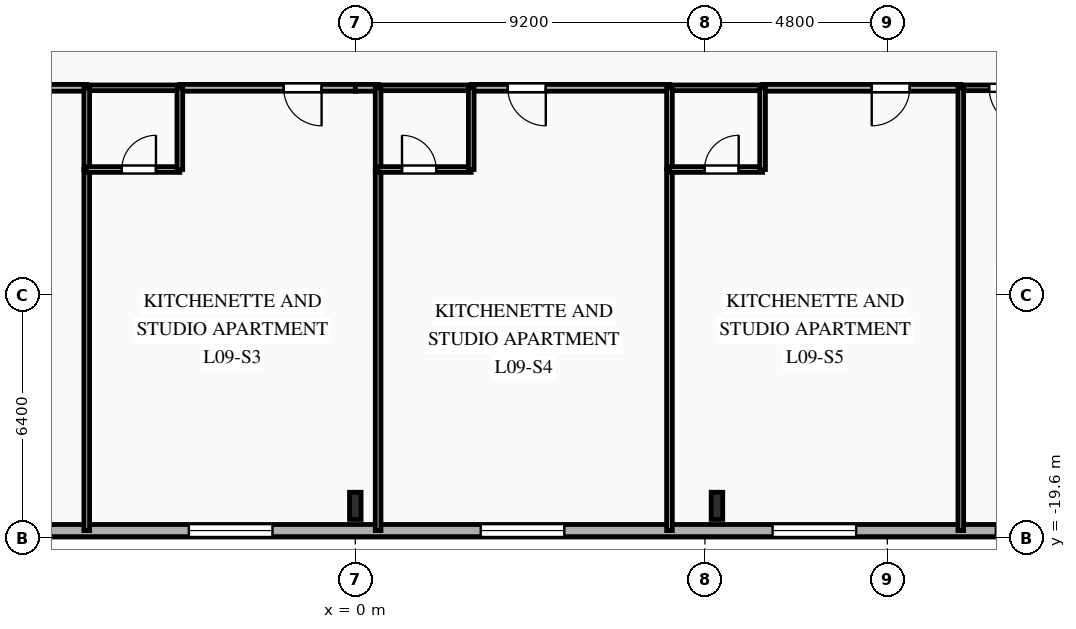
"""IFC4 building model, lengths in metres.
Left out: names, types, materials, properties, quantities, classifications, styles, units other than length and angle.
Written with IfcOpenShell. Run it as: python <this file> out.ifc"""

import sys

from ifc_helpers import new_model, si_unit, direction, frame, frame_2d, origin, origin_2d, place, context, subcontext, project, spatial, rectangle, i_section, extrude, element, fill, save


model = new_model("IFC4")
c1 = context("Model", 3, precision=1e-05, world=origin(), true_north=direction((0.0, 1.0)))
c2 = subcontext(c1, "Body", "Model", "MODEL_VIEW")
j1 = project(units=[si_unit("LENGTHUNIT", "METRE"), si_unit("PLANEANGLEUNIT", "RADIAN")], contexts=[c1])
p1 = place(None, origin())
s1 = spatial("IfcSite", under=j1, at=p1, CompositionType="ELEMENT")
p2 = place(p1, origin())
s2 = spatial("IfcBuilding", under=s1, at=p2, CompositionType="ELEMENT")
p3 = place(p2, frame((0.0, 0.0, 37.05)))
s3 = spatial("IfcBuildingStorey", under=s2, at=p3, CompositionType="ELEMENT", Elevation=37.05)
for number, where, z_axis, x_axis in (
    (1, (0.0, -18.75, 0.0), (0.0, 0.0, 1.0), (1.0, 0.0, 0.0)),
    (2, (9.517, -18.75, 0.0), (0.0, 0.0, 1.0), (1.0, 0.0, 0.0)),
):
    element("IfcColumn", number, at=place(p3, frame(where, z_axis=z_axis, x_axis=x_axis)), inside=s3, PredefinedType="COLUMN", context=c2, shape_type="SweptSolid", body=[
        extrude(i_section(OverallWidth=0.304, OverallDepth=0.716, WebThickness=0.021, FlangeThickness=0.04, FilletRadius=0.027, at=origin_2d()), origin(), (0.0, 0.0, 1.0), 3.35),
    ])
p4 = place(p3, frame((29.2, -19.4, 0.0), z_axis=(0.0, 0.0, 1.0), x_axis=(-1.0, 0.0, 0.0)))
e3 = element("IfcWall", 3, at=p4, inside=s3, PredefinedType="SOLIDWALL", context=c2, shape_type="SweptSolid", body=[
    extrude(rectangle(XDim=58.4, YDim=0.32, at=frame_2d((29.2, 0.0))), origin(), (0.0, 0.0, 1.0), 3.035),
])
p5 = place(p4, frame((3.055, 0.0, 0.85)))
e4 = element("IfcOpeningElement", 4, at=p5, cuts=e3, PredefinedType="OPENING", context=c2, shape_type="SweptSolid", body=[
    extrude(rectangle(XDim=1.65, YDim=1.85, at=frame_2d((0.825, 0.925))), frame((0.0, 0.17, 0.0), z_axis=(0.0, -1.0, 0.0), x_axis=(1.0, 0.0, 0.0)), (0.0, 0.0, 1.0), 0.34),
])
p6 = place(p4, frame((7.175, 0.0, 0.85)))
e5 = element("IfcOpeningElement", 5, at=p6, cuts=e3, PredefinedType="OPENING", context=c2, shape_type="SweptSolid", body=[
    extrude(rectangle(XDim=1.65, YDim=1.85, at=frame_2d((0.825, 0.925))), frame((0.0, 0.17, 0.0), z_axis=(0.0, -1.0, 0.0), x_axis=(1.0, 0.0, 0.0)), (0.0, 0.0, 1.0), 0.34),
])
p7 = place(p4, frame((10.695, 0.0, 0.85)))
e6 = element("IfcOpeningElement", 6, at=p7, cuts=e3, PredefinedType="OPENING", context=c2, shape_type="SweptSolid", body=[
    extrude(rectangle(XDim=1.65, YDim=1.85, at=frame_2d((0.825, 0.925))), frame((0.0, 0.17, 0.0), z_axis=(0.0, -1.0, 0.0), x_axis=(1.0, 0.0, 0.0)), (0.0, 0.0, 1.0), 0.34),
])
p8 = place(p4, frame((16.02, 0.0, 0.85)))
e7 = element("IfcOpeningElement", 7, at=p8, cuts=e3, PredefinedType="OPENING", context=c2, shape_type="SweptSolid", body=[
    extrude(rectangle(XDim=2.2, YDim=1.85, at=frame_2d((1.1, 0.925))), frame((0.0, 0.17, 0.0), z_axis=(0.0, -1.0, 0.0), x_axis=(1.0, 0.0, 0.0)), (0.0, 0.0, 1.0), 0.34),
])
p9 = place(p4, frame((23.7, 0.0, 0.85)))
e8 = element("IfcOpeningElement", 8, at=p9, cuts=e3, PredefinedType="OPENING", context=c2, shape_type="SweptSolid", body=[
    extrude(rectangle(XDim=2.2, YDim=1.85, at=frame_2d((1.1, 0.925))), frame((0.0, 0.17, 0.0), z_axis=(0.0, -1.0, 0.0), x_axis=(1.0, 0.0, 0.0)), (0.0, 0.0, 1.0), 0.34),
])
p10 = place(p4, frame((31.38, 0.0, 0.85)))
e9 = element("IfcOpeningElement", 9, at=p10, cuts=e3, PredefinedType="OPENING", context=c2, shape_type="SweptSolid", body=[
    extrude(rectangle(XDim=2.2, YDim=1.85, at=frame_2d((1.1, 0.925))), frame((0.0, 0.17, 0.0), z_axis=(0.0, -1.0, 0.0), x_axis=(1.0, 0.0, 0.0)), (0.0, 0.0, 1.0), 0.34),
])
p11 = place(p4, frame((39.06, 0.0, 0.85)))
e10 = element("IfcOpeningElement", 10, at=p11, cuts=e3, PredefinedType="OPENING", context=c2, shape_type="SweptSolid", body=[
    extrude(rectangle(XDim=2.2, YDim=1.85, at=frame_2d((1.1, 0.925))), frame((0.0, 0.17, 0.0), z_axis=(0.0, -1.0, 0.0), x_axis=(1.0, 0.0, 0.0)), (0.0, 0.0, 1.0), 0.34),
])
p12 = place(p4, frame((45.215, 0.0, 0.85)))
e11 = element("IfcOpeningElement", 11, at=p12, cuts=e3, PredefinedType="OPENING", context=c2, shape_type="SweptSolid", body=[
    extrude(rectangle(XDim=1.65, YDim=1.85, at=frame_2d((0.825, 0.925))), frame((0.0, 0.17, 0.0), z_axis=(0.0, -1.0, 0.0), x_axis=(1.0, 0.0, 0.0)), (0.0, 0.0, 1.0), 0.34),
])
p13 = place(p4, frame((49.335, 0.0, 0.85)))
e12 = element("IfcOpeningElement", 12, at=p13, cuts=e3, PredefinedType="OPENING", context=c2, shape_type="SweptSolid", body=[
    extrude(rectangle(XDim=1.65, YDim=1.85, at=frame_2d((0.825, 0.925))), frame((0.0, 0.17, 0.0), z_axis=(0.0, -1.0, 0.0), x_axis=(1.0, 0.0, 0.0)), (0.0, 0.0, 1.0), 0.34),
])
p14 = place(p3, frame((-7.067, -7.75, 0.0), z_axis=(0.0, 0.0, 1.0), x_axis=(-1.0, 0.0, 0.0)))
e13 = element("IfcWall", 13, at=p14, inside=s3, PredefinedType="PARTITIONING", context=c2, shape_type="SweptSolid", body=[
    extrude(rectangle(XDim=5.216, YDim=0.18, at=frame_2d((2.608, 0.0))), origin(), (0.0, 0.0, 1.0), 3.035),
])
p15 = place(p14, frame((3.254, 0.0, 0.0)))
e14 = element("IfcOpeningElement", 14, at=p15, cuts=e13, PredefinedType="OPENING", context=c2, shape_type="SweptSolid", body=[
    extrude(rectangle(XDim=1.0, YDim=2.15, at=frame_2d((0.5, 1.075))), frame((0.0, 0.1, 0.0), z_axis=(0.0, -1.0, 0.0), x_axis=(1.0, 0.0, 0.0)), (0.0, 0.0, 1.0), 0.2),
])
p16 = place(p3, frame((0.0, -7.75, 0.0), z_axis=(0.0, 0.0, 1.0), x_axis=(-1.0, 0.0, 0.0)))
e15 = element("IfcWall", 15, at=p16, inside=s3, PredefinedType="PARTITIONING", context=c2, shape_type="SweptSolid", body=[
    extrude(rectangle(XDim=4.617, YDim=0.18, at=frame_2d((2.309, 0.0))), origin(), (0.0, 0.0, 1.0), 3.035),
])
p17 = place(p16, frame((0.887, 0.0, 0.0)))
e16 = element("IfcOpeningElement", 16, at=p17, cuts=e15, PredefinedType="OPENING", context=c2, shape_type="SweptSolid", body=[
    extrude(rectangle(XDim=1.0, YDim=2.15, at=frame_2d((0.5, 1.075))), frame((0.0, 0.1, 0.0), z_axis=(0.0, -1.0, 0.0), x_axis=(1.0, 0.0, 0.0)), (0.0, 0.0, 1.0), 0.2),
])
p18 = place(p3, frame((-4.617, -7.75, 0.0), z_axis=(0.0, 0.0, 1.0), x_axis=(-1.0, 0.0, 0.0)))
e17 = element("IfcWall", 17, at=p18, inside=s3, PredefinedType="PLUMBINGWALL", context=c2, shape_type="SweptSolid", body=[
    extrude(rectangle(XDim=2.45, YDim=0.15, at=frame_2d((1.225, 0.0))), origin(), (0.0, 0.0, 1.0), 3.035),
])
p19 = place(p3, frame((0.6, -7.75, 0.0), z_axis=(0.0, 0.0, 1.0), x_axis=(-1.0, 0.0, 0.0)))
e18 = element("IfcWall", 18, at=p19, inside=s3, PredefinedType="PARTITIONING", context=c2, shape_type="SweptSolid", body=[
    extrude(rectangle(XDim=0.6, YDim=0.18, at=frame_2d((0.3, 0.0))), origin(), (0.0, 0.0, 1.0), 3.035),
])
p20 = place(p3, frame((8.267, -7.75, 0.0), z_axis=(0.0, 0.0, 1.0), x_axis=(-1.0, 0.0, 0.0)))
e19 = element("IfcWall", 19, at=p20, inside=s3, PredefinedType="PARTITIONING", context=c2, shape_type="SweptSolid", body=[
    extrude(rectangle(XDim=5.217, YDim=0.18, at=frame_2d((2.608, 0.0))), origin(), (0.0, 0.0, 1.0), 3.035),
])
p21 = place(p20, frame((3.255, 0.0, 0.0)))
e20 = element("IfcOpeningElement", 20, at=p21, cuts=e19, PredefinedType="OPENING", context=c2, shape_type="SweptSolid", body=[
    extrude(rectangle(XDim=1.0, YDim=2.15, at=frame_2d((0.5, 1.075))), frame((0.0, 0.1, 0.0), z_axis=(0.0, -1.0, 0.0), x_axis=(1.0, 0.0, 0.0)), (0.0, 0.0, 1.0), 0.2),
])
p22 = place(p3, frame((3.05, -7.75, 0.0), z_axis=(0.0, 0.0, 1.0), x_axis=(-1.0, 0.0, 0.0)))
e21 = element("IfcWall", 21, at=p22, inside=s3, PredefinedType="PLUMBINGWALL", context=c2, shape_type="SweptSolid", body=[
    extrude(rectangle(XDim=2.45, YDim=0.15, at=frame_2d((1.225, 0.0))), origin(), (0.0, 0.0, 1.0), 3.035),
])
p23 = place(p3, frame((15.933, -7.75, 0.0), z_axis=(0.0, 0.0, 1.0), x_axis=(-1.0, 0.0, 0.0)))
e22 = element("IfcWall", 22, at=p23, inside=s3, PredefinedType="PARTITIONING", context=c2, shape_type="SweptSolid", body=[
    extrude(rectangle(XDim=5.216, YDim=0.18, at=frame_2d((2.608, 0.0))), origin(), (0.0, 0.0, 1.0), 3.035),
])
p24 = place(p23, frame((1.344, 0.0, 0.0)))
e23 = element("IfcOpeningElement", 23, at=p24, cuts=e22, PredefinedType="OPENING", context=c2, shape_type="SweptSolid", body=[
    extrude(rectangle(XDim=1.0, YDim=2.15, at=frame_2d((0.5, 1.075))), frame((0.0, 0.1, 0.0), z_axis=(0.0, -1.0, 0.0), x_axis=(1.0, 0.0, 0.0)), (0.0, 0.0, 1.0), 0.2),
])
p25 = place(p3, frame((10.717, -7.75, 0.0), z_axis=(0.0, 0.0, 1.0), x_axis=(-1.0, 0.0, 0.0)))
e24 = element("IfcWall", 24, at=p25, inside=s3, PredefinedType="PLUMBINGWALL", context=c2, shape_type="SweptSolid", body=[
    extrude(rectangle(XDim=2.45, YDim=0.15, at=frame_2d((1.225, 0.0))), origin(), (0.0, 0.0, 1.0), 3.035),
])
p26 = place(p3, frame((19.467, -7.75, 0.0), z_axis=(0.0, 0.0, 1.0), x_axis=(-1.0, 0.0, 0.0)))
e25 = element("IfcWall", 25, at=p26, inside=s3, PredefinedType="PARTITIONING", context=c2, shape_type="SweptSolid", body=[
    extrude(rectangle(XDim=3.533, YDim=0.15, at=frame_2d((1.767, 0.0))), origin(), (0.0, 0.0, 1.0), 3.035),
])
p27 = place(p26, frame((1.738, 0.0, 0.0)))
e26 = element("IfcOpeningElement", 26, at=p27, cuts=e25, PredefinedType="OPENING", context=c2, shape_type="SweptSolid", body=[
    extrude(rectangle(XDim=1.05, YDim=2.15, at=frame_2d((0.525, 1.075))), frame((0.0, 0.085, 0.0), z_axis=(0.0, -1.0, 0.0), x_axis=(1.0, 0.0, 0.0)), (0.0, 0.0, 1.0), 0.17),
])
p28 = place(p3, frame((-7.067, -9.9, 0.0), z_axis=(0.0, 0.0, 1.0), x_axis=(0.0, -1.0, 0.0)))
e27 = element("IfcWall", 27, at=p28, inside=s3, PredefinedType="PARTITIONING", context=c2, shape_type="SweptSolid", body=[
    extrude(rectangle(XDim=9.5, YDim=0.15, at=frame_2d((4.75, 0.0))), origin(), (0.0, 0.0, 1.0), 3.035),
])
p29 = place(p3, frame((-7.067, -7.75, 0.0), z_axis=(0.0, 0.0, 1.0), x_axis=(0.0, -1.0, 0.0)))
e28 = element("IfcWall", 28, at=p29, inside=s3, PredefinedType="PLUMBINGWALL", context=c2, shape_type="SweptSolid", body=[
    extrude(rectangle(XDim=2.15, YDim=0.15, at=frame_2d((1.075, 0.0))), origin(), (0.0, 0.0, 1.0), 3.035),
])
p30 = place(p3, frame((-7.067, -9.9, 0.0), z_axis=(0.0, 0.0, 1.0), x_axis=(1.0, 0.0, 0.0)))
e29 = element("IfcWall", 29, at=p30, inside=s3, PredefinedType="PLUMBINGWALL", context=c2, shape_type="SweptSolid", body=[
    extrude(rectangle(XDim=2.45, YDim=0.15, at=frame_2d((1.225, 0.0))), origin(), (0.0, 0.0, 1.0), 3.035),
])
p31 = place(p30, frame((0.921, 0.0, 0.0)))
e30 = element("IfcOpeningElement", 30, at=p31, cuts=e29, PredefinedType="OPENING", context=c2, shape_type="SweptSolid", body=[
    extrude(rectangle(XDim=0.9, YDim=2.1, at=frame_2d((0.45, 1.05))), frame((0.0, 0.085, 0.0), z_axis=(0.0, -1.0, 0.0), x_axis=(1.0, 0.0, 0.0)), (0.0, 0.0, 1.0), 0.17),
])
p32 = place(p3, frame((-4.617, -9.9, 0.0), z_axis=(0.0, 0.0, 1.0), x_axis=(0.0, 1.0, 0.0)))
e31 = element("IfcWall", 31, at=p32, inside=s3, PredefinedType="PLUMBINGWALL", context=c2, shape_type="SweptSolid", body=[
    extrude(rectangle(XDim=2.15, YDim=0.15, at=frame_2d((1.075, 0.0))), origin(), (0.0, 0.0, 1.0), 3.035),
])
p33 = place(p3, frame((0.6, -9.9, 0.0), z_axis=(0.0, 0.0, 1.0), x_axis=(0.0, -1.0, 0.0)))
e32 = element("IfcWall", 32, at=p33, inside=s3, PredefinedType="PARTITIONING", context=c2, shape_type="SweptSolid", body=[
    extrude(rectangle(XDim=9.5, YDim=0.15, at=frame_2d((4.75, 0.0))), origin(), (0.0, 0.0, 1.0), 3.035),
])
p34 = place(p3, frame((0.6, -7.75, 0.0), z_axis=(0.0, 0.0, 1.0), x_axis=(0.0, -1.0, 0.0)))
e33 = element("IfcWall", 33, at=p34, inside=s3, PredefinedType="PLUMBINGWALL", context=c2, shape_type="SweptSolid", body=[
    extrude(rectangle(XDim=2.15, YDim=0.15, at=frame_2d((1.075, 0.0))), origin(), (0.0, 0.0, 1.0), 3.035),
])
p35 = place(p3, frame((0.6, -9.9, 0.0), z_axis=(0.0, 0.0, 1.0), x_axis=(1.0, 0.0, 0.0)))
e34 = element("IfcWall", 34, at=p35, inside=s3, PredefinedType="PLUMBINGWALL", context=c2, shape_type="SweptSolid", body=[
    extrude(rectangle(XDim=2.45, YDim=0.15, at=frame_2d((1.225, 0.0))), origin(), (0.0, 0.0, 1.0), 3.035),
])
p36 = place(p35, frame((0.629, 0.0, 0.0)))
e35 = element("IfcOpeningElement", 35, at=p36, cuts=e34, PredefinedType="OPENING", context=c2, shape_type="SweptSolid", body=[
    extrude(rectangle(XDim=0.9, YDim=2.1, at=frame_2d((0.45, 1.05))), frame((0.0, 0.085, 0.0), z_axis=(0.0, -1.0, 0.0), x_axis=(1.0, 0.0, 0.0)), (0.0, 0.0, 1.0), 0.17),
])
p37 = place(p3, frame((3.05, -9.9, 0.0), z_axis=(0.0, 0.0, 1.0), x_axis=(0.0, 1.0, 0.0)))
e36 = element("IfcWall", 36, at=p37, inside=s3, PredefinedType="PLUMBINGWALL", context=c2, shape_type="SweptSolid", body=[
    extrude(rectangle(XDim=2.15, YDim=0.15, at=frame_2d((1.075, 0.0))), origin(), (0.0, 0.0, 1.0), 3.035),
])
p38 = place(p3, frame((8.267, -9.9, 0.0), z_axis=(0.0, 0.0, 1.0), x_axis=(0.0, -1.0, 0.0)))
e37 = element("IfcWall", 37, at=p38, inside=s3, PredefinedType="PARTITIONING", context=c2, shape_type="SweptSolid", body=[
    extrude(rectangle(XDim=9.5, YDim=0.15, at=frame_2d((4.75, 0.0))), origin(), (0.0, 0.0, 1.0), 3.035),
])
p39 = place(p3, frame((8.267, -7.75, 0.0), z_axis=(0.0, 0.0, 1.0), x_axis=(0.0, -1.0, 0.0)))
e38 = element("IfcWall", 38, at=p39, inside=s3, PredefinedType="PLUMBINGWALL", context=c2, shape_type="SweptSolid", body=[
    extrude(rectangle(XDim=2.15, YDim=0.15, at=frame_2d((1.075, 0.0))), origin(), (0.0, 0.0, 1.0), 3.035),
])
p40 = place(p3, frame((8.267, -9.9, 0.0), z_axis=(0.0, 0.0, 1.0), x_axis=(1.0, 0.0, 0.0)))
e39 = element("IfcWall", 39, at=p40, inside=s3, PredefinedType="PLUMBINGWALL", context=c2, shape_type="SweptSolid", body=[
    extrude(rectangle(XDim=2.45, YDim=0.15, at=frame_2d((1.225, 0.0))), origin(), (0.0, 0.0, 1.0), 3.035),
])
p41 = place(p40, frame((0.921, 0.0, 0.0)))
e40 = element("IfcOpeningElement", 40, at=p41, cuts=e39, PredefinedType="OPENING", context=c2, shape_type="SweptSolid", body=[
    extrude(rectangle(XDim=0.9, YDim=2.1, at=frame_2d((0.45, 1.05))), frame((0.0, 0.085, 0.0), z_axis=(0.0, -1.0, 0.0), x_axis=(1.0, 0.0, 0.0)), (0.0, 0.0, 1.0), 0.17),
])
p42 = place(p3, frame((10.717, -9.9, 0.0), z_axis=(0.0, 0.0, 1.0), x_axis=(0.0, 1.0, 0.0)))
e41 = element("IfcWall", 41, at=p42, inside=s3, PredefinedType="PLUMBINGWALL", context=c2, shape_type="SweptSolid", body=[
    extrude(rectangle(XDim=2.15, YDim=0.15, at=frame_2d((1.075, 0.0))), origin(), (0.0, 0.0, 1.0), 3.035),
])
p43 = place(p3, frame((15.933, -7.75, 0.0), z_axis=(0.0, 0.0, 1.0), x_axis=(0.0, -1.0, 0.0)))
e42 = element("IfcWall", 42, at=p43, inside=s3, PredefinedType="PARTITIONING", context=c2, shape_type="SweptSolid", body=[
    extrude(rectangle(XDim=11.65, YDim=0.15, at=frame_2d((5.825, 0.0))), origin(), (0.0, 0.0, 1.0), 3.035),
])
p44 = place(p7, origin())
e43 = element("IfcWindow", 43, at=p44, inside=s3, PartitioningType="SINGLE_PANEL", PredefinedType="WINDOW", context=c2, shape_type="SweptSolid", body=[
    extrude(rectangle(XDim=1.65, YDim=1.85, at=frame_2d((0.825, 0.925))), frame((0.0, 0.03, 0.0), z_axis=(0.0, -1.0, 0.0), x_axis=(1.0, 0.0, 0.0)), (0.0, 0.0, 1.0), 0.06),
])
fill(e6, e43)
p45 = place(p8, origin())
e44 = element("IfcWindow", 44, at=p45, inside=s3, PartitioningType="SINGLE_PANEL", PredefinedType="WINDOW", context=c2, shape_type="SweptSolid", body=[
    extrude(rectangle(XDim=2.2, YDim=1.85, at=frame_2d((1.1, 0.925))), frame((0.0, 0.03, 0.0), z_axis=(0.0, -1.0, 0.0), x_axis=(1.0, 0.0, 0.0)), (0.0, 0.0, 1.0), 0.06),
])
fill(e7, e44)
p46 = place(p9, origin())
e45 = element("IfcWindow", 45, at=p46, inside=s3, PartitioningType="SINGLE_PANEL", PredefinedType="WINDOW", context=c2, shape_type="SweptSolid", body=[
    extrude(rectangle(XDim=2.2, YDim=1.85, at=frame_2d((1.1, 0.925))), frame((0.0, 0.03, 0.0), z_axis=(0.0, -1.0, 0.0), x_axis=(1.0, 0.0, 0.0)), (0.0, 0.0, 1.0), 0.06),
])
fill(e8, e45)
p47 = place(p10, origin())
e46 = element("IfcWindow", 46, at=p47, inside=s3, PartitioningType="SINGLE_PANEL", PredefinedType="WINDOW", context=c2, shape_type="SweptSolid", body=[
    extrude(rectangle(XDim=2.2, YDim=1.85, at=frame_2d((1.1, 0.925))), frame((0.0, 0.03, 0.0), z_axis=(0.0, -1.0, 0.0), x_axis=(1.0, 0.0, 0.0)), (0.0, 0.0, 1.0), 0.06),
])
fill(e9, e46)
p48 = place(p17, origin())
e47 = element("IfcDoor", 47, at=p48, inside=s3, OperationType="SINGLE_SWING_LEFT", PredefinedType="DOOR", context=c2, shape_type="SweptSolid", body=[
    extrude(rectangle(XDim=1.0, YDim=2.15, at=frame_2d((0.5, 1.075))), frame((0.0, 0.025, 0.0), z_axis=(0.0, -1.0, 0.0), x_axis=(1.0, 0.0, 0.0)), (0.0, 0.0, 1.0), 0.05),
])
fill(e16, e47)
p49 = place(p21, origin())
e48 = element("IfcDoor", 48, at=p49, inside=s3, OperationType="SINGLE_SWING_LEFT", PredefinedType="DOOR", context=c2, shape_type="SweptSolid", body=[
    extrude(rectangle(XDim=1.0, YDim=2.15, at=frame_2d((0.5, 1.075))), frame((0.0, 0.025, 0.0), z_axis=(0.0, -1.0, 0.0), x_axis=(1.0, 0.0, 0.0)), (0.0, 0.0, 1.0), 0.05),
])
fill(e20, e48)
p50 = place(p24, origin())
e49 = element("IfcDoor", 49, at=p50, inside=s3, OperationType="SINGLE_SWING_RIGHT", PredefinedType="DOOR", context=c2, shape_type="SweptSolid", body=[
    extrude(rectangle(XDim=1.0, YDim=2.15, at=frame_2d((0.5, 1.075))), frame((0.0, 0.025, 0.0), z_axis=(0.0, -1.0, 0.0), x_axis=(1.0, 0.0, 0.0)), (0.0, 0.0, 1.0), 0.05),
])
fill(e23, e49)
p51 = place(p27, origin())
e50 = element("IfcDoor", 50, at=p51, inside=s3, OperationType="SINGLE_SWING_LEFT", PredefinedType="DOOR", context=c2, shape_type="SweptSolid", body=[
    extrude(rectangle(XDim=1.05, YDim=2.15, at=frame_2d((0.525, 1.075))), frame((0.0, 0.025, 0.0), z_axis=(0.0, -1.0, 0.0), x_axis=(1.0, 0.0, 0.0)), (0.0, 0.0, 1.0), 0.05),
])
fill(e26, e50)
p52 = place(p31, origin())
e51 = element("IfcDoor", 51, at=p52, inside=s3, OperationType="SINGLE_SWING_RIGHT", PredefinedType="DOOR", context=c2, shape_type="SweptSolid", body=[
    extrude(rectangle(XDim=0.9, YDim=2.1, at=frame_2d((0.45, 1.05))), frame((0.0, 0.025, 0.0), z_axis=(0.0, -1.0, 0.0), x_axis=(1.0, 0.0, 0.0)), (0.0, 0.0, 1.0), 0.05),
])
fill(e30, e51)
p53 = place(p36, origin())
e52 = element("IfcDoor", 52, at=p53, inside=s3, OperationType="SINGLE_SWING_LEFT", PredefinedType="DOOR", context=c2, shape_type="SweptSolid", body=[
    extrude(rectangle(XDim=0.9, YDim=2.1, at=frame_2d((0.45, 1.05))), frame((0.0, 0.025, 0.0), z_axis=(0.0, -1.0, 0.0), x_axis=(1.0, 0.0, 0.0)), (0.0, 0.0, 1.0), 0.05),
])
fill(e35, e52)
p54 = place(p41, origin())
e53 = element("IfcDoor", 53, at=p54, inside=s3, OperationType="SINGLE_SWING_RIGHT", PredefinedType="DOOR", context=c2, shape_type="SweptSolid", body=[
    extrude(rectangle(XDim=0.9, YDim=2.1, at=frame_2d((0.45, 1.05))), frame((0.0, 0.025, 0.0), z_axis=(0.0, -1.0, 0.0), x_axis=(1.0, 0.0, 0.0)), (0.0, 0.0, 1.0), 0.05),
])
fill(e40, e53)
save(model, sys.argv[1])
